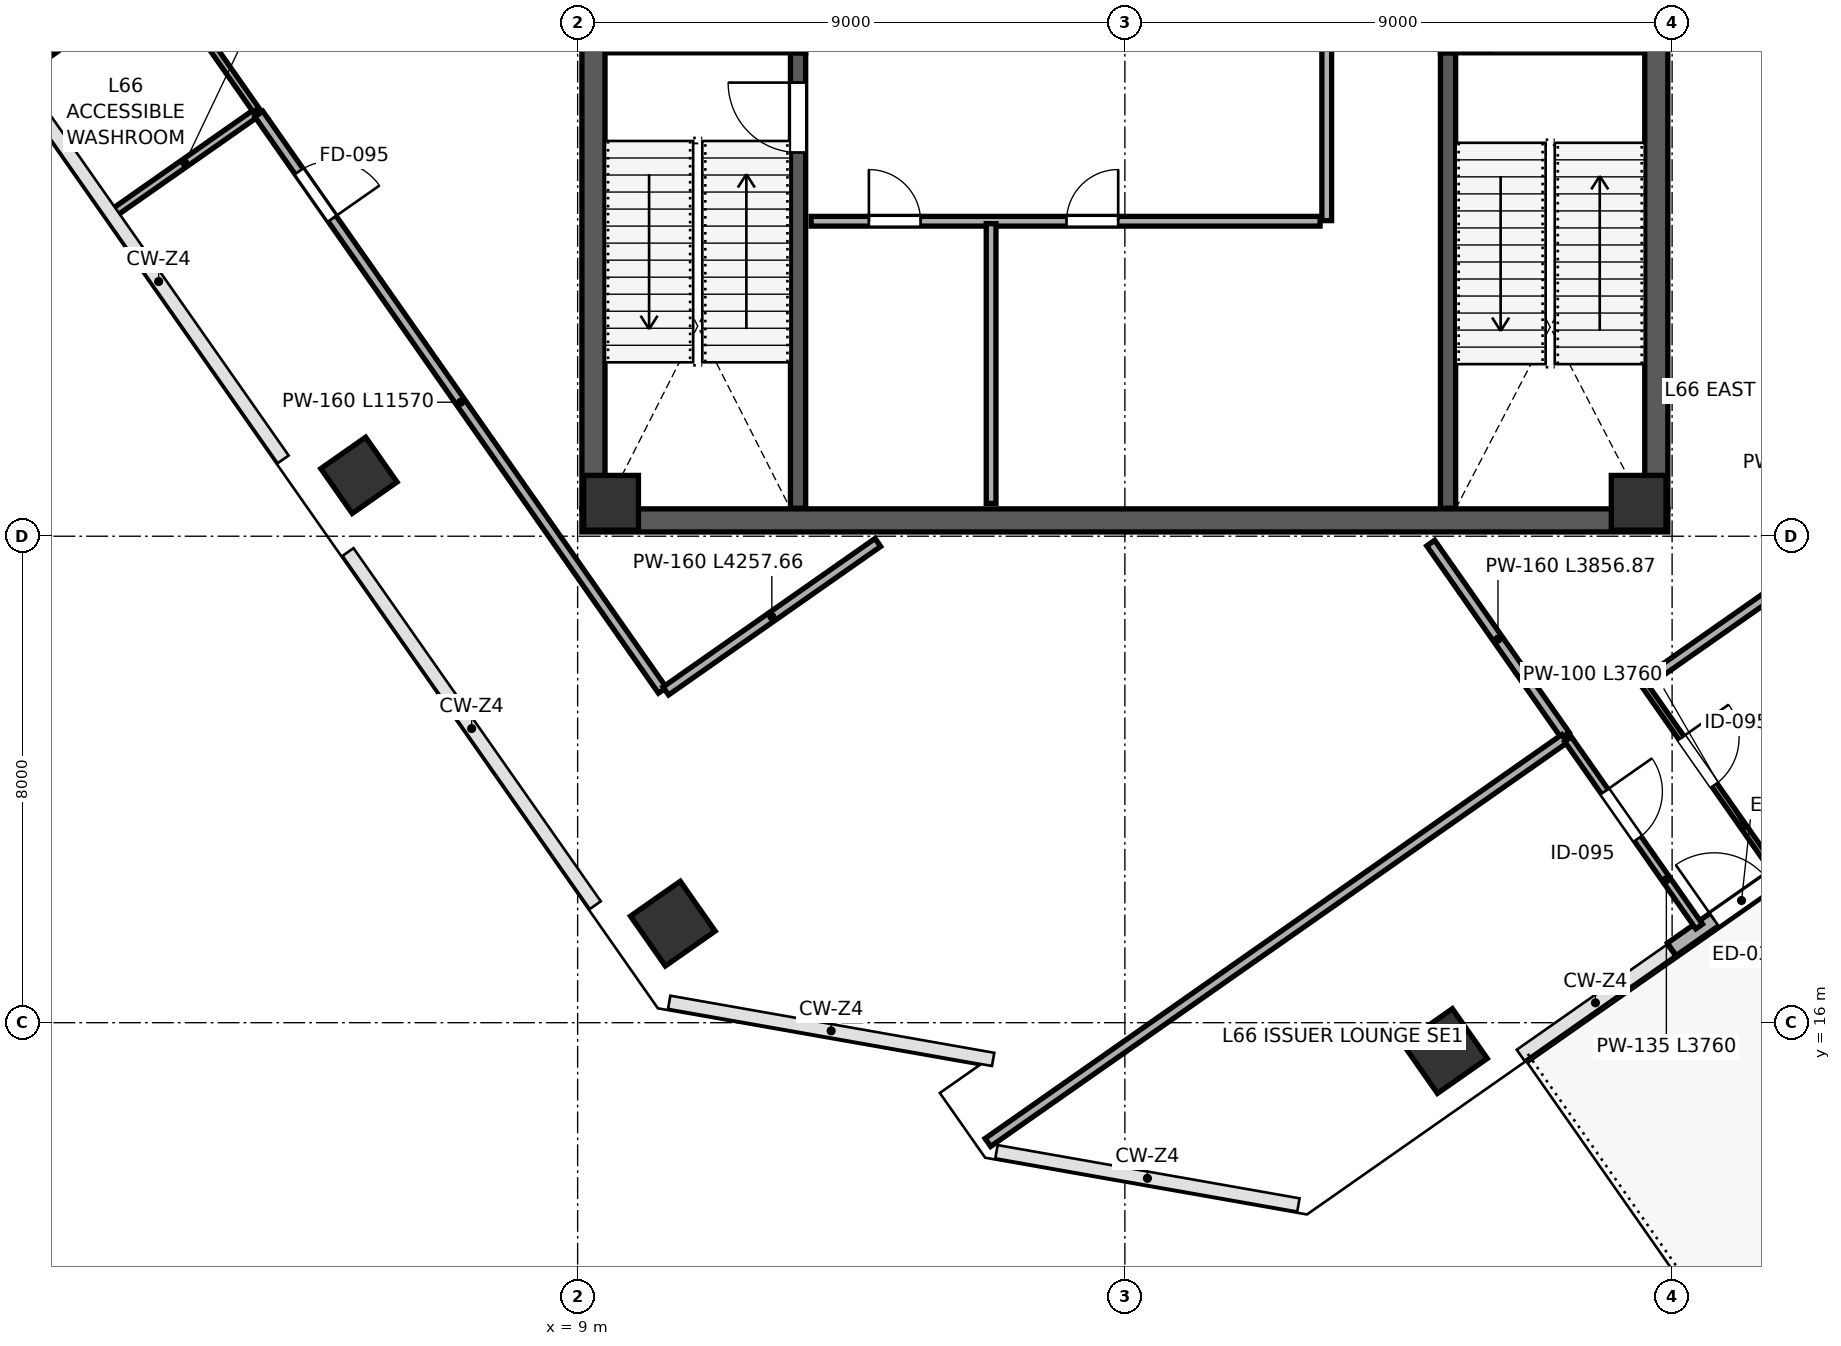
"""IFC4 building model, lengths in metres.
Left out: names, types, materials, properties, quantities, classifications, styles, units other than length and angle.
Written with IfcOpenShell. Run it as: python <this file> out.ifc"""

import sys

from ifc_helpers import new_model, si_unit, direction, frame, frame_2d, origin, origin_2d, place, context, subcontext, project, spatial, rectangle, extrude, source, transform, mapped, element, fill, save


model = new_model("IFC4")
c1 = context("Model", 3, precision=1e-05, world=origin(), true_north=direction((0.0, 1.0)))
c2 = subcontext(c1, "Body", "Model", "MODEL_VIEW")
j1 = project(units=[si_unit("LENGTHUNIT", "METRE"), si_unit("PLANEANGLEUNIT", "RADIAN")], contexts=[c1])
p1 = place(None, origin())
s1 = spatial("IfcSite", under=j1, at=p1, CompositionType="ELEMENT")
p2 = place(p1, origin())
s2 = spatial("IfcBuilding", under=s1, at=p2, CompositionType="ELEMENT")
p3 = place(p2, frame((0.0, 0.0, 293.8)))
s3 = spatial("IfcBuildingStorey", under=s2, at=p3, CompositionType="ELEMENT", Elevation=293.8)
m1 = source(origin(), c2, "Body", "SweptSolid", [
    extrude(rectangle(XDim=0.9, YDim=0.9, at=origin_2d()), origin(), (0.0, 0.0, 1.0), 4.999),
])
for number, where, z_axis, x_axis in (
    (1, (9.55, 24.55, 0.001), (0.0, 0.0, 1.0), (1.0, 0.0, 0.0)),
    (2, (26.45, 24.55, 0.001), (0.0, 0.0, 1.0), (1.0, 0.0, 0.0)),
):
    element("IfcColumn", number, at=place(p3, frame(where, z_axis=z_axis, x_axis=x_axis)), inside=s3, PredefinedType="COLUMN", context=c2, shape_type="MappedRepresentation", body=[
        mapped(m1, transform((0.0, 0.0, 0.0), scale=1.0)),
    ])
m2 = source(origin(), c2, "Body", "SweptSolid", [
    extrude(rectangle(XDim=0.9, YDim=0.9, at=origin_2d()), origin(), (0.0, 0.0, 1.0), 4.999),
])
for number, where, z_axis, x_axis in (
    (3, (0.241, 32.374, 0.001), (0.0, 0.0, 1.0), (-0.574, 0.819, 0.0)),
    (4, (5.403, 25.001, 0.001), (0.0, 0.0, 1.0), (-0.574, 0.819, 0.0)),
):
    element("IfcColumn", number, at=place(p3, frame(where, z_axis=z_axis, x_axis=x_axis)), inside=s3, PredefinedType="COLUMN", context=c2, shape_type="MappedRepresentation", body=[
        mapped(m2, transform((0.0, 0.0, 0.0), scale=1.0)),
    ])
m3 = source(origin(), c2, "Body", "SweptSolid", [
    extrude(rectangle(XDim=1.0, YDim=1.0, at=origin_2d()), origin(), (0.0, 0.0, 1.0), 4.999),
])
for number, where, z_axis, x_axis in (
    (5, (10.565, 17.629, 0.001), (0.0, 0.0, 1.0), (-0.574, 0.819, 0.0)),
    (6, (23.264, 15.534, 0.001), (0.0, 0.0, 1.0), (-0.574, 0.819, 0.0)),
):
    element("IfcColumn", number, at=place(p3, frame(where, z_axis=z_axis, x_axis=x_axis)), inside=s3, PredefinedType="COLUMN", context=c2, shape_type="MappedRepresentation", body=[
        mapped(m3, transform((0.0, 0.0, 0.0), scale=1.0)),
    ])
p4 = place(p3, frame((26.995, 17.206, 0.0), z_axis=(0.0, 0.0, 1.0), x_axis=(0.819141785879, 0.573591086599, 0.0)))
e7 = element("IfcWall", 7, at=p4, inside=s3, PredefinedType="SOLIDWALL", context=c2, shape_type="SweptSolid", body=[
    extrude(rectangle(XDim=2.8, YDim=0.25, at=frame_2d((1.4, 0.0))), origin(), (0.0, 0.0, 1.0), 4.76),
])
p5 = place(p4, frame((0.85, 0.0, 0.0)))
e8 = element("IfcOpeningElement", 8, at=p5, cuts=e7, PredefinedType="OPENING", context=c2, shape_type="SweptSolid", body=[
    extrude(rectangle(XDim=1.1, YDim=2.2, at=frame_2d((0.55, 1.1))), frame((0.0, 0.135, 0.0), z_axis=(0.0, -1.0, 0.0), x_axis=(1.0, 0.0, 0.0)), (0.0, 0.0, 1.0), 0.27),
])
p6 = place(p3, frame((9.26, 24.45, 0.0), z_axis=(0.0, 0.0, 1.0), x_axis=(0.0, 1.0, 0.0)))
e9 = element("IfcWall", 9, at=p6, inside=s3, PredefinedType="SHEAR", context=c2, shape_type="SweptSolid", body=[
    extrude(rectangle(XDim=15.1, YDim=0.38, at=frame_2d((7.55, 0.0))), origin(), (0.0, 0.0, 1.0), 4.76),
])
p7 = place(p6, frame((8.7, 0.0, 0.0)))
e10 = element("IfcOpeningElement", 10, at=p7, cuts=e9, PredefinedType="OPENING", context=c2, shape_type="SweptSolid", body=[
    extrude(rectangle(XDim=1.15, YDim=2.2, at=frame_2d((0.575, 1.1))), frame((0.0, 0.2, 0.0), z_axis=(0.0, -1.0, 0.0), x_axis=(1.0, 0.0, 0.0)), (0.0, 0.0, 1.0), 0.4),
])
p8 = place(p3, frame((26.74, 24.45, 0.0), z_axis=(0.0, 0.0, 1.0), x_axis=(0.0, 1.0, 0.0)))
e11 = element("IfcWall", 11, at=p8, inside=s3, PredefinedType="SHEAR", context=c2, shape_type="SweptSolid", body=[
    extrude(rectangle(XDim=15.1, YDim=0.38, at=frame_2d((7.55, 0.0))), origin(), (0.0, 0.0, 1.0), 4.76),
])
p9 = place(p8, frame((8.6, 0.0, 0.0)))
e12 = element("IfcOpeningElement", 12, at=p9, cuts=e11, PredefinedType="OPENING", context=c2, shape_type="SweptSolid", body=[
    extrude(rectangle(XDim=1.15, YDim=2.2, at=frame_2d((0.575, 1.1))), frame((0.0, 0.2, 0.0), z_axis=(0.0, -1.0, 0.0), x_axis=(1.0, 0.0, 0.0)), (0.0, 0.0, 1.0), 0.4),
])
p10 = place(p3, frame((9.07, 24.26, 0.0), z_axis=(0.0, 0.0, 1.0), x_axis=(1.0, 0.0, 0.0)))
e13 = element("IfcWall", 13, at=p10, inside=s3, PredefinedType="SHEAR", context=c2, shape_type="SweptSolid", body=[
    extrude(rectangle(XDim=17.86, YDim=0.38, at=frame_2d((8.93, 0.0))), origin(), (0.0, 0.0, 1.0), 4.76),
])
p11 = place(p3, frame((12.625, 24.46, 0.0), z_axis=(0.0, 0.0, 1.0), x_axis=(0.0, 1.0, 0.0)))
e14 = element("IfcWall", 14, at=p11, inside=s3, PredefinedType="SHEAR", context=c2, shape_type="SweptSolid", body=[
    extrude(rectangle(XDim=7.49, YDim=0.25, at=frame_2d((3.745, 0.0))), origin(), (0.0, 0.0, 1.0), 4.76),
])
p12 = place(p11, frame((5.85, 0.0, 0.0)))
e15 = element("IfcOpeningElement", 15, at=p12, cuts=e14, PredefinedType="OPENING", context=c2, shape_type="SweptSolid", body=[
    extrude(rectangle(XDim=1.15, YDim=2.2, at=frame_2d((0.575, 1.1))), frame((0.0, 0.135, 0.0), z_axis=(0.0, -1.0, 0.0), x_axis=(1.0, 0.0, 0.0)), (0.0, 0.0, 1.0), 0.27),
])
p13 = place(p3, frame((9.46, 32.075, 0.0), z_axis=(0.0, 0.0, 1.0), x_axis=(1.0, 0.0, 0.0)))
e16 = element("IfcWall", 16, at=p13, inside=s3, PredefinedType="SHEAR", context=c2, shape_type="SweptSolid", body=[
    extrude(rectangle(XDim=3.29, YDim=0.25, at=frame_2d((1.645, 0.0))), origin(), (0.0, 0.0, 1.0), 4.76),
])
p14 = place(p3, frame((23.315, 24.46, 0.0), z_axis=(0.0, 0.0, 1.0), x_axis=(0.0, 1.0, 0.0)))
e17 = element("IfcWall", 17, at=p14, inside=s3, PredefinedType="SHEAR", context=c2, shape_type="SweptSolid", body=[
    extrude(rectangle(XDim=7.49, YDim=0.25, at=frame_2d((3.745, 0.0))), origin(), (0.0, 0.0, 1.0), 4.76),
])
p15 = place(p3, frame((23.19, 32.075, 0.0), z_axis=(0.0, 0.0, 1.0), x_axis=(1.0, 0.0, 0.0)))
e18 = element("IfcWall", 18, at=p15, inside=s3, PredefinedType="SHEAR", context=c2, shape_type="SweptSolid", body=[
    extrude(rectangle(XDim=3.35, YDim=0.25, at=frame_2d((1.675, 0.0))), origin(), (0.0, 0.0, 1.0), 4.76),
])
p16 = place(p15, frame((0.85, 0.0, 0.0)))
e19 = element("IfcOpeningElement", 19, at=p16, cuts=e18, PredefinedType="OPENING", context=c2, shape_type="SweptSolid", body=[
    extrude(rectangle(XDim=1.15, YDim=2.2, at=frame_2d((0.575, 1.1))), frame((0.0, 0.135, 0.0), z_axis=(0.0, -1.0, 0.0), x_axis=(1.0, 0.0, 0.0)), (0.0, 0.0, 1.0), 0.27),
])
p17 = place(p3, frame((12.84, 29.18, 0.0), z_axis=(0.0, 0.0, 1.0), x_axis=(1.0, 0.0, 0.0)))
e20 = element("IfcWall", 20, at=p17, inside=s3, PredefinedType="PARTITIONING", context=c2, shape_type="SweptSolid", body=[
    extrude(rectangle(XDim=8.37, YDim=0.16, at=frame_2d((4.185, 0.0))), origin(), (0.0, 0.0, 1.0), 4.76),
])
p18 = place(p17, frame((0.95, 0.0, 0.0)))
e21 = element("IfcOpeningElement", 21, at=p18, cuts=e20, PredefinedType="OPENING", context=c2, shape_type="SweptSolid", body=[
    extrude(rectangle(XDim=0.85, YDim=2.1, at=frame_2d((0.425, 1.05))), frame((0.0, 0.09, 0.0), z_axis=(0.0, -1.0, 0.0), x_axis=(1.0, 0.0, 0.0)), (0.0, 0.0, 1.0), 0.18),
])
p19 = place(p17, frame((4.2, 0.0, 0.0)))
e22 = element("IfcOpeningElement", 22, at=p19, cuts=e20, PredefinedType="OPENING", context=c2, shape_type="SweptSolid", body=[
    extrude(rectangle(XDim=0.85, YDim=2.1, at=frame_2d((0.425, 1.05))), frame((0.0, 0.09, 0.0), z_axis=(0.0, -1.0, 0.0), x_axis=(1.0, 0.0, 0.0)), (0.0, 0.0, 1.0), 0.18),
])
p20 = place(p3, frame((15.8, 24.54, 0.0), z_axis=(0.0, 0.0, 1.0), x_axis=(0.0, 1.0, 0.0)))
e23 = element("IfcWall", 23, at=p20, inside=s3, PredefinedType="PARTITIONING", context=c2, shape_type="SweptSolid", body=[
    extrude(rectangle(XDim=4.6, YDim=0.16, at=frame_2d((2.3, 0.0))), origin(), (0.0, 0.0, 1.0), 4.76),
])
p21 = place(p3, frame((21.32, 29.19, 0.0), z_axis=(0.0, 0.0, 1.0), x_axis=(0.0, 1.0, 0.0)))
e24 = element("IfcWall", 24, at=p21, inside=s3, PredefinedType="PARTITIONING", context=c2, shape_type="SweptSolid", body=[
    extrude(rectangle(XDim=2.92, YDim=0.16, at=frame_2d((1.46, 0.0))), origin(), (0.0, 0.0, 1.0), 4.76),
])
p22 = place(p3, frame((-0.431, 31.904, 0.0), z_axis=(0.0, 0.0, 1.0), x_axis=(0.819122867865, 0.573618102347, 0.0)))
e25 = element("IfcWall", 25, at=p22, inside=s3, PredefinedType="PARTITIONING", context=c2, shape_type="SweptSolid", body=[
    extrude(rectangle(XDim=2.84, YDim=0.1, at=frame_2d((1.42, 0.0))), origin(), (0.0, 0.0, 1.0), 4.095),
])
p23 = place(p3, frame((1.376, 29.323, 0.0), z_axis=(0.0, 0.0, 1.0), x_axis=(0.819163257805, 0.573560421458, 0.0)))
e26 = element("IfcWall", 26, at=p23, inside=s3, PredefinedType="PARTITIONING", context=c2, shape_type="SweptSolid", body=[
    extrude(rectangle(XDim=2.84, YDim=0.135, at=frame_2d((1.42, 0.0))), origin(), (0.0, 0.0, 1.0), 4.095),
])
p24 = place(p3, frame((-0.544, 37.086, 0.0), z_axis=(0.0, 0.0, 1.0), x_axis=(0.573568336404, -0.819157715873, 0.0)))
e27 = element("IfcWall", 27, at=p24, inside=s3, PredefinedType="PARTITIONING", context=c2, shape_type="SweptSolid", body=[
    extrude(rectangle(XDim=7.42, YDim=0.115, at=frame_2d((3.71, 0.0))), origin(), (0.0, 0.0, 1.0), 4.76),
])
p25 = place(p24, frame((2.9, 0.0, 0.0)))
e28 = element("IfcOpeningElement", 28, at=p25, cuts=e27, PredefinedType="OPENING", context=c2, shape_type="SweptSolid", body=[
    extrude(rectangle(XDim=0.9, YDim=2.15, at=frame_2d((0.45, 1.075))), frame((0.0, 0.067, 0.0), z_axis=(0.0, -1.0, 0.0), x_axis=(1.0, 0.0, 0.0)), (0.0, 0.0, 1.0), 0.135),
])
p26 = place(p24, frame((5.0, 0.0, 0.0)))
e29 = element("IfcOpeningElement", 29, at=p26, cuts=e27, PredefinedType="OPENING", context=c2, shape_type="SweptSolid", body=[
    extrude(rectangle(XDim=0.95, YDim=2.15, at=frame_2d((0.475, 1.075))), frame((0.0, 0.067, 0.0), z_axis=(0.0, -1.0, 0.0), x_axis=(1.0, 0.0, 0.0)), (0.0, 0.0, 1.0), 0.135),
])
p27 = place(p3, frame((3.758, 30.942, 0.0), z_axis=(0.0, 0.0, 1.0), x_axis=(0.573575634469, -0.819152605772, 0.0)))
e30 = element("IfcWall", 30, at=p27, inside=s3, PredefinedType="PARTITIONING", context=c2, shape_type="SweptSolid", body=[
    extrude(rectangle(XDim=11.57, YDim=0.16, at=frame_2d((5.785, 0.0))), origin(), (0.0, 0.0, 1.0), 4.76),
])
p28 = place(p27, frame((1.15, 0.0, 0.0)))
e31 = element("IfcOpeningElement", 31, at=p28, cuts=e30, PredefinedType="OPENING", context=c2, shape_type="SweptSolid", body=[
    extrude(rectangle(XDim=0.95, YDim=2.15, at=frame_2d((0.475, 1.075))), frame((0.0, 0.09, 0.0), z_axis=(0.0, -1.0, 0.0), x_axis=(1.0, 0.0, 0.0)), (0.0, 0.0, 1.0), 0.18),
])
p29 = place(p3, frame((10.45, 21.455, 0.0), z_axis=(0.0, 0.0, 1.0), x_axis=(0.819110678768, 0.573635507903, 0.0)))
e32 = element("IfcWall", 32, at=p29, inside=s3, PredefinedType="PARTITIONING", context=c2, shape_type="SweptSolid", body=[
    extrude(rectangle(XDim=4.258, YDim=0.16, at=frame_2d((2.129, 0.0))), origin(), (0.0, 0.0, 1.0), 4.76),
])
p30 = place(p3, frame((23.03, 23.887, 0.0), z_axis=(0.0, 0.0, 1.0), x_axis=(0.573602525203, -0.819133776059, 0.0)))
e33 = element("IfcWall", 33, at=p30, inside=s3, PredefinedType="PARTITIONING", context=c2, shape_type="SweptSolid", body=[
    extrude(rectangle(XDim=3.857, YDim=0.16, at=frame_2d((1.928, 0.0))), origin(), (0.0, 0.0, 1.0), 4.76),
])
p31 = place(p3, frame((21.918, 49.884, 0.0), z_axis=(0.0, 0.0, 1.0), x_axis=(0.57358495776, -0.819146077468, 0.0)))
e34 = element("IfcWall", 34, at=p31, inside=s3, PredefinedType="PARTITIONING", context=c2, shape_type="SweptSolid", body=[
    extrude(rectangle(XDim=25.79, YDim=0.1, at=frame_2d((12.895, 0.0))), origin(), (0.0, 0.0, 1.0), 4.76),
])
p32 = place(p31, frame((9.2, 0.0, 0.0)))
e35 = element("IfcOpeningElement", 35, at=p32, cuts=e34, PredefinedType="OPENING", context=c2, shape_type="SweptSolid", body=[
    extrude(rectangle(XDim=0.95, YDim=2.15, at=frame_2d((0.475, 1.075))), frame((0.0, 0.06, 0.0), z_axis=(0.0, -1.0, 0.0), x_axis=(1.0, 0.0, 0.0)), (0.0, 0.0, 1.0), 0.12),
])
p33 = place(p3, frame((26.559, 21.601, 0.0), z_axis=(0.0, 0.0, 1.0), x_axis=(0.819143682501, 0.573588378036, 0.0)))
e36 = element("IfcWall", 36, at=p33, inside=s3, PredefinedType="PARTITIONING", context=c2, shape_type="SweptSolid", body=[
    extrude(rectangle(XDim=9.49, YDim=0.16, at=frame_2d((4.745, 0.0))), origin(), (0.0, 0.0, 1.0), 4.76),
])
p34 = place(p3, frame((15.747, 14.03, 0.0), z_axis=(0.0, 0.0, 1.0), x_axis=(0.819150694041, 0.573578364701, 0.0)))
e37 = element("IfcWall", 37, at=p34, inside=s3, PredefinedType="PARTITIONING", context=c2, shape_type="SweptSolid", body=[
    extrude(rectangle(XDim=11.58, YDim=0.16, at=frame_2d((5.79, 0.0))), origin(), (0.0, 0.0, 1.0), 4.76),
])
p35 = place(p3, frame((26.55, 21.546, 0.0), z_axis=(0.0, 0.0, 1.0), x_axis=(0.573614860738, -0.8191251379, 0.0)))
e38 = element("IfcWall", 38, at=p35, inside=s3, PredefinedType="PARTITIONING", context=c2, shape_type="SweptSolid", body=[
    extrude(rectangle(XDim=3.76, YDim=0.1, at=frame_2d((1.88, 0.0))), origin(), (0.0, 0.0, 1.0), 4.76),
])
p36 = place(p35, frame((1.05, 0.0, 0.0)))
e39 = element("IfcOpeningElement", 39, at=p36, cuts=e38, PredefinedType="OPENING", context=c2, shape_type="SweptSolid", body=[
    extrude(rectangle(XDim=0.95, YDim=2.15, at=frame_2d((0.475, 1.075))), frame((0.0, 0.06, 0.0), z_axis=(0.0, -1.0, 0.0), x_axis=(1.0, 0.0, 0.0)), (0.0, 0.0, 1.0), 0.12),
])
p37 = place(p3, frame((25.288, 20.662, 0.0), z_axis=(0.0, 0.0, 1.0), x_axis=(0.573614860738, -0.8191251379, 0.0)))
e40 = element("IfcWall", 40, at=p37, inside=s3, PredefinedType="PARTITIONING", context=c2, shape_type="SweptSolid", body=[
    extrude(rectangle(XDim=3.76, YDim=0.135, at=frame_2d((1.88, 0.0))), origin(), (0.0, 0.0, 1.0), 4.76),
])
p38 = place(p37, frame((1.05, 0.0, 0.0)))
e41 = element("IfcOpeningElement", 41, at=p38, cuts=e40, PredefinedType="OPENING", context=c2, shape_type="SweptSolid", body=[
    extrude(rectangle(XDim=0.95, YDim=2.15, at=frame_2d((0.475, 1.075))), frame((0.0, 0.078, 0.0), z_axis=(0.0, -1.0, 0.0), x_axis=(1.0, 0.0, 0.0)), (0.0, 0.0, 1.0), 0.155),
])
m4 = source(origin(), c2, "Body", "SweptSolid", [
    extrude(rectangle(XDim=1.1, YDim=2.2, at=frame_2d((0.55, 1.1))), frame((0.0, 0.025, 0.0), z_axis=(0.0, -1.0, 0.0), x_axis=(1.0, 0.0, 0.0)), (0.0, 0.0, 1.0), 0.05),
])
p39 = place(p5, origin())
e42 = element("IfcDoor", 42, at=p39, inside=s3, OperationType="SINGLE_SWING_LEFT", PredefinedType="DOOR", context=c2, shape_type="MappedRepresentation", body=[
    mapped(m4, transform((0.0, 0.0, 0.0), scale=1.0)),
])
fill(e8, e42)
m5 = source(origin(), c2, "Body", "SweptSolid", [
    extrude(rectangle(XDim=1.15, YDim=2.2, at=frame_2d((0.575, 1.1))), frame((0.0, 0.025, 0.0), z_axis=(0.0, -1.0, 0.0), x_axis=(1.0, 0.0, 0.0)), (0.0, 0.0, 1.0), 0.05),
])
p40 = place(p12, origin())
e43 = element("IfcDoor", 43, at=p40, inside=s3, OperationType="SINGLE_SWING_RIGHT", PredefinedType="DOOR", context=c2, shape_type="MappedRepresentation", body=[
    mapped(m5, transform((0.0, 0.0, 0.0), scale=1.0)),
])
fill(e15, e43)
m6 = source(origin(), c2, "Body", "SweptSolid", [
    extrude(rectangle(XDim=0.85, YDim=2.1, at=frame_2d((0.425, 1.05))), frame((0.0, 0.025, 0.0), z_axis=(0.0, -1.0, 0.0), x_axis=(1.0, 0.0, 0.0)), (0.0, 0.0, 1.0), 0.05),
])
p41 = place(p18, origin())
e44 = element("IfcDoor", 44, at=p41, inside=s3, OperationType="SINGLE_SWING_LEFT", PredefinedType="DOOR", context=c2, shape_type="MappedRepresentation", body=[
    mapped(m6, transform((0.0, 0.0, 0.0), scale=1.0)),
])
fill(e21, e44)
p42 = place(p19, origin())
e45 = element("IfcDoor", 45, at=p42, inside=s3, OperationType="SINGLE_SWING_RIGHT", PredefinedType="DOOR", context=c2, shape_type="MappedRepresentation", body=[
    mapped(m6, transform((0.0, 0.0, 0.0), scale=1.0)),
])
fill(e22, e45)
m7 = source(origin(), c2, "Body", "SweptSolid", [
    extrude(rectangle(XDim=0.95, YDim=2.15, at=frame_2d((0.475, 1.075))), frame((0.0, 0.025, 0.0), z_axis=(0.0, -1.0, 0.0), x_axis=(1.0, 0.0, 0.0)), (0.0, 0.0, 1.0), 0.05),
])
p43 = place(p28, origin())
e46 = element("IfcDoor", 46, at=p43, inside=s3, OperationType="SINGLE_SWING_RIGHT", PredefinedType="DOOR", context=c2, shape_type="MappedRepresentation", body=[
    mapped(m7, transform((0.0, 0.0, 0.0), scale=1.0)),
])
fill(e31, e46)
m8 = source(origin(), c2, "Body", "SweptSolid", [
    extrude(rectangle(XDim=0.95, YDim=2.15, at=frame_2d((0.475, 1.075))), frame((0.0, 0.025, 0.0), z_axis=(0.0, -1.0, 0.0), x_axis=(1.0, 0.0, 0.0)), (0.0, 0.0, 1.0), 0.05),
])
p44 = place(p36, origin())
e47 = element("IfcDoor", 47, at=p44, inside=s3, OperationType="SINGLE_SWING_LEFT", PredefinedType="DOOR", context=c2, shape_type="MappedRepresentation", body=[
    mapped(m8, transform((0.0, 0.0, 0.0), scale=1.0)),
])
fill(e39, e47)
p45 = place(p38, origin())
e48 = element("IfcDoor", 48, at=p45, inside=s3, OperationType="SINGLE_SWING_LEFT", PredefinedType="DOOR", context=c2, shape_type="MappedRepresentation", body=[
    mapped(m8, transform((0.0, 0.0, 0.0), scale=1.0)),
])
fill(e41, e48)
save(model, sys.argv[1])
